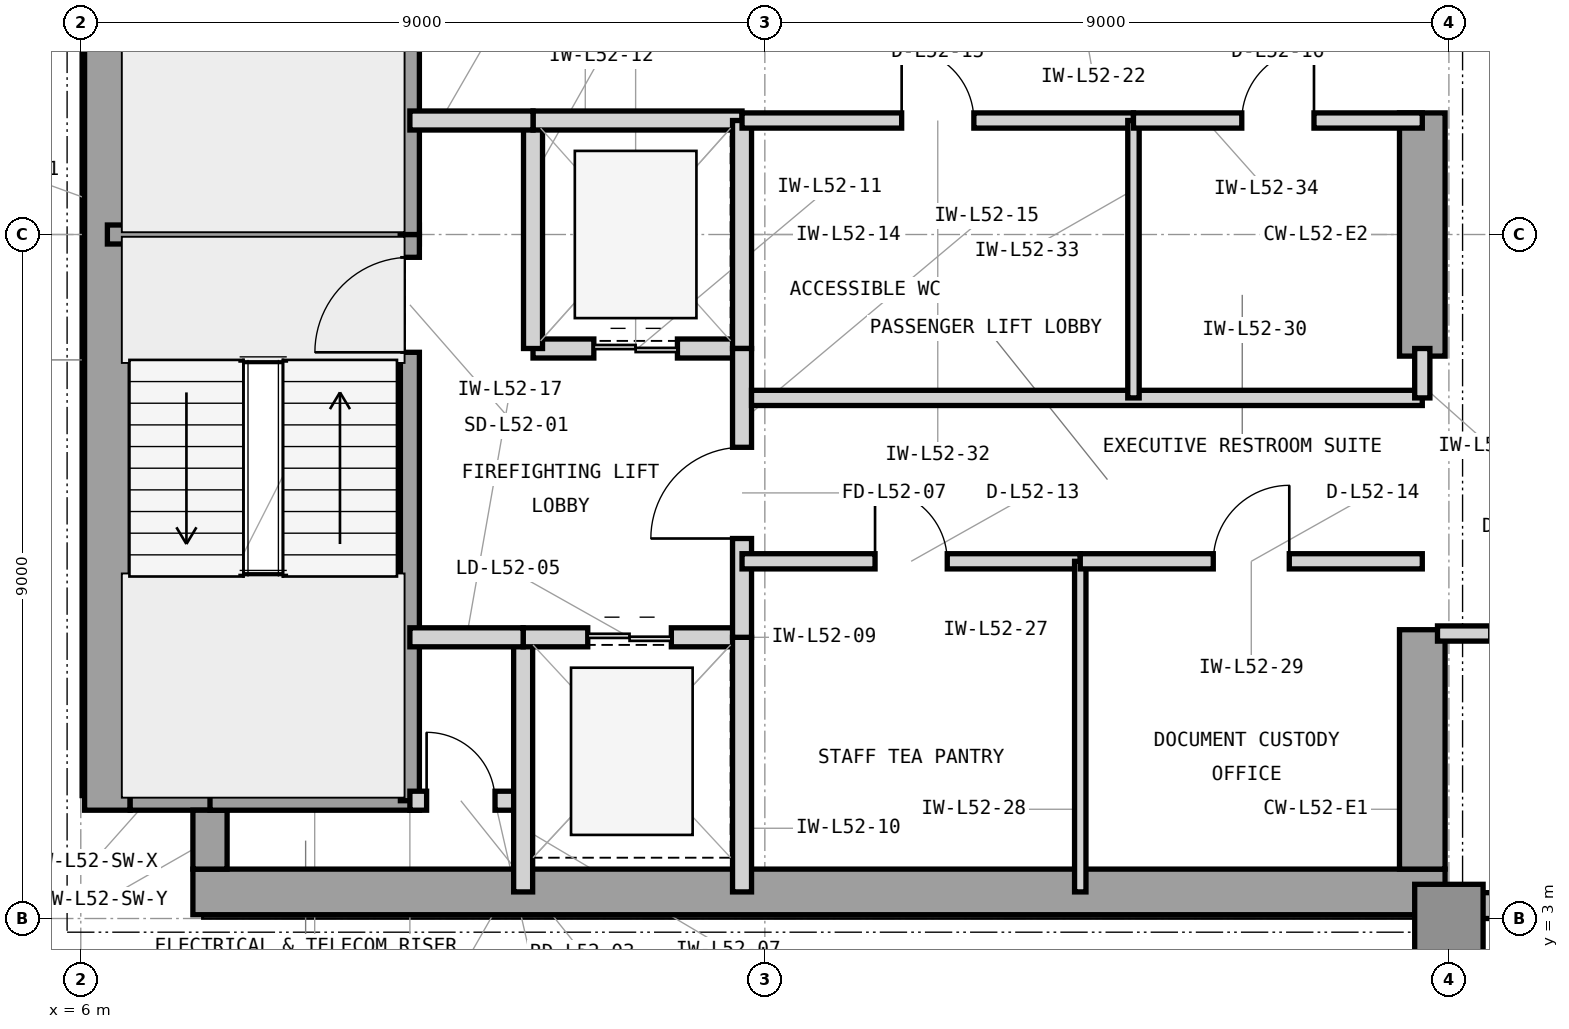
"""IFC4 building model, lengths in metres.
Left out: names, types, materials, properties, quantities, classifications, styles, units other than length and angle.
Written with IfcOpenShell. Run it as: python <this file> out.ifc"""

import sys

from ifc_helpers import new_model, si_unit, direction, frame, frame_2d, origin, origin_2d, place, context, subcontext, project, spatial, rectangle, extrude, element, fill, save


model = new_model("IFC4")
c1 = context("Model", 3, precision=1e-05, world=origin(), true_north=direction((0.0, 1.0)))
c2 = subcontext(c1, "Body", "Model", "MODEL_VIEW")
j1 = project(units=[si_unit("LENGTHUNIT", "METRE"), si_unit("PLANEANGLEUNIT", "RADIAN")], contexts=[c1])
p1 = place(None, origin())
s1 = spatial("IfcSite", under=j1, at=p1, CompositionType="ELEMENT")
p2 = place(p1, origin())
s2 = spatial("IfcBuilding", under=s1, at=p2, CompositionType="ELEMENT")
p3 = place(p2, frame((0.0, 0.0, 215.1)))
s3 = spatial("IfcBuildingStorey", under=s2, at=p3, CompositionType="ELEMENT", Elevation=215.1)
p4 = place(p3, frame((7.475, 3.35, 0.0), z_axis=(0.0, 0.0, 1.0), x_axis=(1.0, 0.0, 0.0)))
e1 = element("IfcWall", 1, at=p4, inside=s3, PredefinedType="SHEAR", context=c2, shape_type="SweptSolid", body=[
    extrude(rectangle(XDim=16.475, YDim=0.6, at=frame_2d((8.237, 0.0))), origin(), (0.0, 0.0, 1.0), 3.9),
])
p5 = place(p3, frame((6.35, 4.425, 0.0), z_axis=(0.0, 0.0, 1.0), x_axis=(0.0, 1.0, 0.0)))
e2 = element("IfcWall", 2, at=p5, inside=s3, PredefinedType="SHEAR", context=c2, shape_type="SweptSolid", body=[
    extrude(rectangle(XDim=15.15, YDim=0.6, at=frame_2d((7.575, 0.0))), origin(), (0.0, 0.0, 1.0), 3.9),
])
p6 = place(p3, frame((23.65, 3.65, 0.0), z_axis=(0.0, 0.0, 1.0), x_axis=(0.0, 1.0, 0.0)))
e3 = element("IfcWall", 3, at=p6, inside=s3, PredefinedType="SHEAR", context=c2, shape_type="SweptSolid", body=[
    extrude(rectangle(XDim=3.15, YDim=0.6, at=frame_2d((1.575, 0.0))), origin(), (0.0, 0.0, 1.0), 3.9),
])
p7 = place(p3, frame((23.65, 10.4, 0.0), z_axis=(0.0, 0.0, 1.0), x_axis=(0.0, 1.0, 0.0)))
e4 = element("IfcWall", 4, at=p7, inside=s3, PredefinedType="SHEAR", context=c2, shape_type="SweptSolid", body=[
    extrude(rectangle(XDim=3.2, YDim=0.6, at=frame_2d((1.6, 0.0))), origin(), (0.0, 0.0, 1.0), 3.9),
])
p8 = place(p3, frame((6.65, 4.65, 0.0), z_axis=(0.0, 0.0, 1.0), x_axis=(1.0, 0.0, 0.0)))
e5 = element("IfcWall", 5, at=p8, inside=s3, PredefinedType="SHEAR", context=c2, shape_type="SweptSolid", body=[
    extrude(rectangle(XDim=1.275, YDim=0.45, at=frame_2d((0.638, 0.0))), origin(), (0.0, 0.0, 1.0), 3.9),
])
p9 = place(p3, frame((7.7, 3.65, 0.0), z_axis=(0.0, 0.0, 1.0), x_axis=(0.0, 1.0, 0.0)))
e6 = element("IfcWall", 6, at=p9, inside=s3, PredefinedType="SHEAR", context=c2, shape_type="SweptSolid", body=[
    extrude(rectangle(XDim=0.775, YDim=0.45, at=frame_2d((0.388, 0.0))), origin(), (0.0, 0.0, 1.0), 3.9),
])
p10 = place(p3, frame((24.0, 3.0, 0.0), z_axis=(0.0, 0.0, 1.0), x_axis=(1.0, 0.0, 0.0)))
e7 = element("IfcColumn", 7, at=p10, inside=s3, PredefinedType="COLUMN", context=c2, shape_type="SweptSolid", body=[
    extrude(rectangle(XDim=0.9, YDim=0.9, at=origin_2d()), origin(), (0.0, 0.0, 1.0), 3.9),
])
p11 = place(p3, frame((23.9, 3.17, 0.0), z_axis=(0.0, 0.0, 1.0), x_axis=(1.0, 0.0, 0.0)))
e8 = element("IfcWall", 8, at=p11, inside=s3, PredefinedType="STANDARD", context=c2, shape_type="SweptSolid", body=[
    extrude(rectangle(XDim=31.5, YDim=0.34, at=frame_2d((15.75, 0.0))), origin(), (0.0, 0.0, 1.0), 3.7),
])
p12 = place(p11, frame((5.6, 0.0, 0.9)))
e9 = element("IfcOpeningElement", 9, at=p12, cuts=e8, PredefinedType="OPENING", context=c2, shape_type="SweptSolid", body=[
    extrude(rectangle(XDim=2.3, YDim=2.2, at=frame_2d((1.15, 1.1))), frame((0.0, 0.18, 0.0), z_axis=(0.0, -1.0, 0.0), x_axis=(1.0, 0.0, 0.0)), (0.0, 0.0, 1.0), 0.36),
])
p13 = place(p11, frame((14.6, 0.0, 0.9)))
e10 = element("IfcOpeningElement", 10, at=p13, cuts=e8, PredefinedType="OPENING", context=c2, shape_type="SweptSolid", body=[
    extrude(rectangle(XDim=2.3, YDim=2.2, at=frame_2d((1.15, 1.1))), frame((0.0, 0.18, 0.0), z_axis=(0.0, -1.0, 0.0), x_axis=(1.0, 0.0, 0.0)), (0.0, 0.0, 1.0), 0.36),
])
p14 = place(p11, frame((19.1, 0.0, 0.9)))
e11 = element("IfcOpeningElement", 11, at=p14, cuts=e8, PredefinedType="OPENING", context=c2, shape_type="SweptSolid", body=[
    extrude(rectangle(XDim=2.3, YDim=2.2, at=frame_2d((1.15, 1.1))), frame((0.0, 0.18, 0.0), z_axis=(0.0, -1.0, 0.0), x_axis=(1.0, 0.0, 0.0)), (0.0, 0.0, 1.0), 0.36),
])
p15 = place(p11, frame((0.9, 0.0, 0.9)))
e12 = element("IfcOpeningElement", 12, at=p15, cuts=e8, PredefinedType="OPENING", context=c2, shape_type="SweptSolid", body=[
    extrude(rectangle(XDim=1.6, YDim=2.2, at=frame_2d((0.8, 1.1))), frame((0.0, 0.18, 0.0), z_axis=(0.0, -1.0, 0.0), x_axis=(1.0, 0.0, 0.0)), (0.0, 0.0, 1.0), 0.36),
])
p16 = place(p3, frame((6.35, 12.0, 0.0), z_axis=(0.0, 0.0, 1.0), x_axis=(1.0, 0.0, 0.0)))
e13 = element("IfcWall", 13, at=p16, inside=s3, PredefinedType="SHEAR", context=c2, shape_type="SweptSolid", body=[
    extrude(rectangle(XDim=4.105, YDim=0.25, at=frame_2d((2.052, 0.0))), origin(), (0.0, 0.0, 1.0), 3.9),
])
p17 = place(p3, frame((7.7, 4.55, 0.0), z_axis=(0.0, 0.0, 1.0), x_axis=(1.0, 0.0, 0.0)))
e14 = element("IfcWall", 14, at=p17, inside=s3, PredefinedType="SHEAR", context=c2, shape_type="SweptSolid", body=[
    extrude(rectangle(XDim=2.755, YDim=0.25, at=frame_2d((1.377, 0.0))), origin(), (0.0, 0.0, 1.0), 3.9),
])
p18 = place(p3, frame((10.33, 4.55, 0.0), z_axis=(0.0, 0.0, 1.0), x_axis=(0.0, 1.0, 0.0)))
e15 = element("IfcWall", 15, at=p18, inside=s3, PredefinedType="SHEAR", context=c2, shape_type="SweptSolid", body=[
    extrude(rectangle(XDim=7.45, YDim=0.25, at=frame_2d((3.725, 0.0))), origin(), (0.0, 0.0, 1.0), 3.9),
])
p19 = place(p18, frame((5.9, 0.0, 0.0)))
e16 = element("IfcOpeningElement", 16, at=p19, cuts=e15, PredefinedType="OPENING", context=c2, shape_type="SweptSolid", body=[
    extrude(rectangle(XDim=1.25, YDim=2.2, at=frame_2d((0.625, 1.1))), frame((0.0, 0.135, 0.0), z_axis=(0.0, -1.0, 0.0), x_axis=(1.0, 0.0, 0.0)), (0.0, 0.0, 1.0), 0.27),
])
p20 = place(p3, frame((10.33, 12.0, 0.0), z_axis=(0.0, 0.0, 1.0), x_axis=(0.0, 1.0, 0.0)))
e17 = element("IfcWall", 17, at=p20, inside=s3, PredefinedType="SHEAR", context=c2, shape_type="SweptSolid", body=[
    extrude(rectangle(XDim=7.45, YDim=0.25, at=frame_2d((3.725, 0.0))), origin(), (0.0, 0.0, 1.0), 3.9),
])
p21 = place(p20, frame((5.85, 0.0, 0.0)))
e18 = element("IfcOpeningElement", 18, at=p21, cuts=e17, PredefinedType="OPENING", context=c2, shape_type="SweptSolid", body=[
    extrude(rectangle(XDim=1.25, YDim=2.2, at=frame_2d((0.625, 1.1))), frame((0.0, 0.135, 0.0), z_axis=(0.0, -1.0, 0.0), x_axis=(1.0, 0.0, 0.0)), (0.0, 0.0, 1.0), 0.27),
])
p22 = place(p3, frame((10.33, 4.55, 0.0), z_axis=(0.0, 0.0, 1.0), x_axis=(1.0, 0.0, 0.0)))
e19 = element("IfcWall", 19, at=p22, inside=s3, PredefinedType="PARTITIONING", context=c2, shape_type="SweptSolid", body=[
    extrude(rectangle(XDim=1.49, YDim=0.25, at=frame_2d((0.745, 0.0))), origin(), (0.0, 0.0, 1.0), 3.69),
])
p23 = place(p22, frame((0.22, 0.0, 0.0)))
e20 = element("IfcOpeningElement", 20, at=p23, cuts=e19, PredefinedType="OPENING", context=c2, shape_type="SweptSolid", body=[
    extrude(rectangle(XDim=0.9, YDim=2.1, at=frame_2d((0.45, 1.05))), frame((0.0, 0.135, 0.0), z_axis=(0.0, -1.0, 0.0), x_axis=(1.0, 0.0, 0.0)), (0.0, 0.0, 1.0), 0.27),
])
p24 = place(p3, frame((11.82, 3.35, 0.0), z_axis=(0.0, 0.0, 1.0), x_axis=(0.0, 1.0, 0.0)))
e21 = element("IfcWall", 21, at=p24, inside=s3, PredefinedType="PARTITIONING", context=c2, shape_type="SweptSolid", body=[
    extrude(rectangle(XDim=3.35, YDim=0.25, at=frame_2d((1.675, 0.0))), origin(), (0.0, 0.0, 1.0), 3.69),
])
p25 = place(p3, frame((11.82, 6.7, 0.0), z_axis=(0.0, 0.0, 1.0), x_axis=(1.0, 0.0, 0.0)))
e22 = element("IfcWall", 22, at=p25, inside=s3, PredefinedType="PARTITIONING", context=c2, shape_type="SweptSolid", body=[
    extrude(rectangle(XDim=2.88, YDim=0.25, at=frame_2d((1.44, 0.0))), origin(), (0.0, 0.0, 1.0), 3.283),
])
p26 = place(p25, frame((0.85, 0.0, 0.0)))
e23 = element("IfcOpeningElement", 23, at=p26, cuts=e22, PredefinedType="OPENING", context=c2, shape_type="SweptSolid", body=[
    extrude(rectangle(XDim=1.1, YDim=2.25, at=frame_2d((0.55, 1.125))), frame((0.0, 0.135, 0.0), z_axis=(0.0, -1.0, 0.0), x_axis=(1.0, 0.0, 0.0)), (0.0, 0.0, 1.0), 0.27),
])
p27 = place(p3, frame((14.7, 3.35, 0.0), z_axis=(0.0, 0.0, 1.0), x_axis=(0.0, 1.0, 0.0)))
e24 = element("IfcWall", 24, at=p27, inside=s3, PredefinedType="PARTITIONING", context=c2, shape_type="SweptSolid", body=[
    extrude(rectangle(XDim=3.35, YDim=0.25, at=frame_2d((1.675, 0.0))), origin(), (0.0, 0.0, 1.0), 3.69),
])
p28 = place(p3, frame((11.95, 10.5, 0.0), z_axis=(0.0, 0.0, 1.0), x_axis=(1.0, 0.0, 0.0)))
e25 = element("IfcWall", 25, at=p28, inside=s3, PredefinedType="PARTITIONING", context=c2, shape_type="SweptSolid", body=[
    extrude(rectangle(XDim=2.75, YDim=0.25, at=frame_2d((1.375, 0.0))), origin(), (0.0, 0.0, 1.0), 3.283),
])
p29 = place(p28, frame((0.8, 0.0, 0.0)))
e26 = element("IfcOpeningElement", 26, at=p29, cuts=e25, PredefinedType="OPENING", context=c2, shape_type="SweptSolid", body=[
    extrude(rectangle(XDim=1.1, YDim=2.25, at=frame_2d((0.55, 1.125))), frame((0.0, 0.135, 0.0), z_axis=(0.0, -1.0, 0.0), x_axis=(1.0, 0.0, 0.0)), (0.0, 0.0, 1.0), 0.27),
])
p30 = place(p3, frame((11.95, 10.5, 0.0), z_axis=(0.0, 0.0, 1.0), x_axis=(0.0, 1.0, 0.0)))
e27 = element("IfcWall", 27, at=p30, inside=s3, PredefinedType="PARTITIONING", context=c2, shape_type="SweptSolid", body=[
    extrude(rectangle(XDim=3.0, YDim=0.25, at=frame_2d((1.5, 0.0))), origin(), (0.0, 0.0, 1.0), 3.69),
])
p31 = place(p3, frame((11.95, 13.5, 0.0), z_axis=(0.0, 0.0, 1.0), x_axis=(1.0, 0.0, 0.0)))
e28 = element("IfcWall", 28, at=p31, inside=s3, PredefinedType="PARTITIONING", context=c2, shape_type="SweptSolid", body=[
    extrude(rectangle(XDim=2.75, YDim=0.25, at=frame_2d((1.375, 0.0))), origin(), (0.0, 0.0, 1.0), 3.283),
])
p32 = place(p3, frame((14.7, 10.5, 0.0), z_axis=(0.0, 0.0, 1.0), x_axis=(0.0, 1.0, 0.0)))
e29 = element("IfcWall", 29, at=p32, inside=s3, PredefinedType="PARTITIONING", context=c2, shape_type="SweptSolid", body=[
    extrude(rectangle(XDim=3.0, YDim=0.25, at=frame_2d((1.5, 0.0))), origin(), (0.0, 0.0, 1.0), 3.69),
])
p33 = place(p3, frame((14.7, 6.7, 0.0), z_axis=(0.0, 0.0, 1.0), x_axis=(0.0, 1.0, 0.0)))
e30 = element("IfcWall", 30, at=p33, inside=s3, PredefinedType="PARTITIONING", context=c2, shape_type="SweptSolid", body=[
    extrude(rectangle(XDim=3.8, YDim=0.25, at=frame_2d((1.9, 0.0))), origin(), (0.0, 0.0, 1.0), 3.69),
])
p34 = place(p33, frame((1.3, 0.0, 0.0)))
e31 = element("IfcOpeningElement", 31, at=p34, cuts=e30, PredefinedType="OPENING", context=c2, shape_type="SweptSolid", body=[
    extrude(rectangle(XDim=1.2, YDim=2.2, at=frame_2d((0.6, 1.1))), frame((0.0, 0.135, 0.0), z_axis=(0.0, -1.0, 0.0), x_axis=(1.0, 0.0, 0.0)), (0.0, 0.0, 1.0), 0.27),
])
p35 = place(p3, frame((10.33, 13.5, 0.0), z_axis=(0.0, 0.0, 1.0), x_axis=(1.0, 0.0, 0.0)))
e32 = element("IfcWall", 32, at=p35, inside=s3, PredefinedType="PARTITIONING", context=c2, shape_type="SweptSolid", body=[
    extrude(rectangle(XDim=1.62, YDim=0.25, at=frame_2d((0.81, 0.0))), origin(), (0.0, 0.0, 1.0), 3.283),
])
p36 = place(p3, frame((10.33, 6.7, 0.0), z_axis=(0.0, 0.0, 1.0), x_axis=(1.0, 0.0, 0.0)))
e33 = element("IfcWall", 33, at=p36, inside=s3, PredefinedType="PARTITIONING", context=c2, shape_type="SweptSolid", body=[
    extrude(rectangle(XDim=1.49, YDim=0.25, at=frame_2d((0.745, 0.0))), origin(), (0.0, 0.0, 1.0), 3.283),
])
p37 = place(p3, frame((14.7, 7.7, 0.0), z_axis=(0.0, 0.0, 1.0), x_axis=(1.0, 0.0, 0.0)))
e34 = element("IfcWall", 34, at=p37, inside=s3, PredefinedType="PARTITIONING", context=c2, shape_type="SweptSolid", body=[
    extrude(rectangle(XDim=4.45, YDim=0.2, at=frame_2d((2.225, 0.0))), origin(), (0.0, 0.0, 1.0), 3.69),
])
p38 = place(p37, frame((1.75, 0.0, 0.0)))
e35 = element("IfcOpeningElement", 35, at=p38, cuts=e34, PredefinedType="OPENING", context=c2, shape_type="SweptSolid", body=[
    extrude(rectangle(XDim=0.95, YDim=2.1, at=frame_2d((0.475, 1.05))), frame((0.0, 0.11, 0.0), z_axis=(0.0, -1.0, 0.0), x_axis=(1.0, 0.0, 0.0)), (0.0, 0.0, 1.0), 0.22),
])
p39 = place(p3, frame((19.15, 3.35, 0.0), z_axis=(0.0, 0.0, 1.0), x_axis=(0.0, 1.0, 0.0)))
e36 = element("IfcWall", 36, at=p39, inside=s3, PredefinedType="PARTITIONING", context=c2, shape_type="SweptSolid", body=[
    extrude(rectangle(XDim=4.35, YDim=0.15, at=frame_2d((2.175, 0.0))), origin(), (0.0, 0.0, 1.0), 3.69),
])
p40 = place(p3, frame((19.15, 7.7, 0.0), z_axis=(0.0, 0.0, 1.0), x_axis=(1.0, 0.0, 0.0)))
e37 = element("IfcWall", 37, at=p40, inside=s3, PredefinedType="PARTITIONING", context=c2, shape_type="SweptSolid", body=[
    extrude(rectangle(XDim=4.5, YDim=0.2, at=frame_2d((2.25, 0.0))), origin(), (0.0, 0.0, 1.0), 3.69),
])
p41 = place(p40, frame((1.75, 0.0, 0.0)))
e38 = element("IfcOpeningElement", 38, at=p41, cuts=e37, PredefinedType="OPENING", context=c2, shape_type="SweptSolid", body=[
    extrude(rectangle(XDim=1.0, YDim=2.15, at=frame_2d((0.5, 1.075))), frame((0.0, 0.11, 0.0), z_axis=(0.0, -1.0, 0.0), x_axis=(1.0, 0.0, 0.0)), (0.0, 0.0, 1.0), 0.22),
])
p42 = place(p3, frame((14.825, 9.85, 0.0), z_axis=(0.0, 0.0, 1.0), x_axis=(1.0, 0.0, 0.0)))
e39 = element("IfcWall", 39, at=p42, inside=s3, PredefinedType="PARTITIONING", context=c2, shape_type="SweptSolid", body=[
    extrude(rectangle(XDim=8.825, YDim=0.2, at=frame_2d((4.413, 0.0))), origin(), (0.0, 0.0, 1.0), 3.69),
])
p43 = place(p3, frame((23.65, 9.85, 0.0), z_axis=(0.0, 0.0, 1.0), x_axis=(0.0, 1.0, 0.0)))
e40 = element("IfcWall", 40, at=p43, inside=s3, PredefinedType="PARTITIONING", context=c2, shape_type="SweptSolid", body=[
    extrude(rectangle(XDim=0.65, YDim=0.2, at=frame_2d((0.325, 0.0))), origin(), (0.0, 0.0, 1.0), 3.69),
])
p44 = place(p3, frame((14.7, 13.5, 0.0), z_axis=(0.0, 0.0, 1.0), x_axis=(1.0, 0.0, 0.0)))
e41 = element("IfcWall", 41, at=p44, inside=s3, PredefinedType="PARTITIONING", context=c2, shape_type="SweptSolid", body=[
    extrude(rectangle(XDim=5.15, YDim=0.2, at=frame_2d((2.575, 0.0))), origin(), (0.0, 0.0, 1.0), 3.283),
])
p45 = place(p44, frame((2.1, 0.0, 0.0)))
e42 = element("IfcOpeningElement", 42, at=p45, cuts=e41, PredefinedType="OPENING", context=c2, shape_type="SweptSolid", body=[
    extrude(rectangle(XDim=0.95, YDim=2.1, at=frame_2d((0.475, 1.05))), frame((0.0, 0.11, 0.0), z_axis=(0.0, -1.0, 0.0), x_axis=(1.0, 0.0, 0.0)), (0.0, 0.0, 1.0), 0.22),
])
p46 = place(p3, frame((19.85, 9.85, 0.0), z_axis=(0.0, 0.0, 1.0), x_axis=(0.0, 1.0, 0.0)))
e43 = element("IfcWall", 43, at=p46, inside=s3, PredefinedType="PARTITIONING", context=c2, shape_type="SweptSolid", body=[
    extrude(rectangle(XDim=3.65, YDim=0.15, at=frame_2d((1.825, 0.0))), origin(), (0.0, 0.0, 1.0), 3.69),
])
p47 = place(p3, frame((19.85, 13.5, 0.0), z_axis=(0.0, 0.0, 1.0), x_axis=(1.0, 0.0, 0.0)))
e44 = element("IfcWall", 44, at=p47, inside=s3, PredefinedType="PARTITIONING", context=c2, shape_type="SweptSolid", body=[
    extrude(rectangle(XDim=3.8, YDim=0.2, at=frame_2d((1.9, 0.0))), origin(), (0.0, 0.0, 1.0), 3.283),
])
p48 = place(p47, frame((1.425, 0.0, 0.0)))
e45 = element("IfcOpeningElement", 45, at=p48, cuts=e44, PredefinedType="OPENING", context=c2, shape_type="SweptSolid", body=[
    extrude(rectangle(XDim=0.95, YDim=2.1, at=frame_2d((0.475, 1.05))), frame((0.0, 0.11, 0.0), z_axis=(0.0, -1.0, 0.0), x_axis=(1.0, 0.0, 0.0)), (0.0, 0.0, 1.0), 0.22),
])
p49 = place(p3, frame((23.85, 6.75, 0.0), z_axis=(0.0, 0.0, 1.0), x_axis=(1.0, 0.0, 0.0)))
e46 = element("IfcWall", 46, at=p49, inside=s3, PredefinedType="PARTITIONING", context=c2, shape_type="SweptSolid", body=[
    extrude(rectangle(XDim=2.85, YDim=0.2, at=frame_2d((1.425, 0.0))), origin(), (0.0, 0.0, 1.0), 3.69),
])
p50 = place(p49, frame((0.7, 0.0, 0.0)))
e47 = element("IfcOpeningElement", 47, at=p50, cuts=e46, PredefinedType="OPENING", context=c2, shape_type="SweptSolid", body=[
    extrude(rectangle(XDim=1.0, YDim=2.15, at=frame_2d((0.5, 1.075))), frame((0.0, 0.11, 0.0), z_axis=(0.0, -1.0, 0.0), x_axis=(1.0, 0.0, 0.0)), (0.0, 0.0, 1.0), 0.22),
])
p51 = place(p19, origin())
e48 = element("IfcDoor", 48, at=p51, inside=s3, OperationType="SINGLE_SWING_LEFT", PredefinedType="DOOR", context=c2, shape_type="SweptSolid", body=[
    extrude(rectangle(XDim=1.25, YDim=2.2, at=frame_2d((0.625, 1.1))), frame((0.0, 0.025, 0.0), z_axis=(0.0, -1.0, 0.0), x_axis=(1.0, 0.0, 0.0)), (0.0, 0.0, 1.0), 0.05),
])
fill(e16, e48)
p52 = place(p23, origin())
e49 = element("IfcDoor", 49, at=p52, inside=s3, OperationType="SINGLE_SWING_LEFT", PredefinedType="TRAPDOOR", context=c2, shape_type="SweptSolid", body=[
    extrude(rectangle(XDim=0.9, YDim=2.1, at=frame_2d((0.45, 1.05))), frame((0.0, 0.025, 0.0), z_axis=(0.0, -1.0, 0.0), x_axis=(1.0, 0.0, 0.0)), (0.0, 0.0, 1.0), 0.05),
])
fill(e20, e49)
p53 = place(p26, origin())
e50 = element("IfcDoor", 50, at=p53, inside=s3, OperationType="DOUBLE_DOOR_SLIDING", PredefinedType="DOOR", context=c2, shape_type="SweptSolid", body=[
    extrude(rectangle(XDim=1.1, YDim=2.25, at=frame_2d((0.55, 1.125))), frame((0.0, 0.025, 0.0), z_axis=(0.0, -1.0, 0.0), x_axis=(1.0, 0.0, 0.0)), (0.0, 0.0, 1.0), 0.05),
])
fill(e23, e50)
p54 = place(p29, origin())
e51 = element("IfcDoor", 51, at=p54, inside=s3, OperationType="DOUBLE_DOOR_SLIDING", PredefinedType="DOOR", context=c2, shape_type="SweptSolid", body=[
    extrude(rectangle(XDim=1.1, YDim=2.25, at=frame_2d((0.55, 1.125))), frame((0.0, 0.025, 0.0), z_axis=(0.0, -1.0, 0.0), x_axis=(1.0, 0.0, 0.0)), (0.0, 0.0, 1.0), 0.05),
])
fill(e26, e51)
p55 = place(p34, origin())
e52 = element("IfcDoor", 52, at=p55, inside=s3, OperationType="SINGLE_SWING_LEFT", PredefinedType="DOOR", context=c2, shape_type="SweptSolid", body=[
    extrude(rectangle(XDim=1.2, YDim=2.2, at=frame_2d((0.6, 1.1))), frame((0.0, 0.025, 0.0), z_axis=(0.0, -1.0, 0.0), x_axis=(1.0, 0.0, 0.0)), (0.0, 0.0, 1.0), 0.05),
])
fill(e31, e52)
p56 = place(p38, origin())
e53 = element("IfcDoor", 53, at=p56, inside=s3, OperationType="SINGLE_SWING_LEFT", PredefinedType="DOOR", context=c2, shape_type="SweptSolid", body=[
    extrude(rectangle(XDim=0.95, YDim=2.1, at=frame_2d((0.475, 1.05))), frame((0.0, 0.025, 0.0), z_axis=(0.0, -1.0, 0.0), x_axis=(1.0, 0.0, 0.0)), (0.0, 0.0, 1.0), 0.05),
])
fill(e35, e53)
p57 = place(p41, origin())
e54 = element("IfcDoor", 54, at=p57, inside=s3, OperationType="SINGLE_SWING_RIGHT", PredefinedType="DOOR", context=c2, shape_type="SweptSolid", body=[
    extrude(rectangle(XDim=1.0, YDim=2.15, at=frame_2d((0.5, 1.075))), frame((0.0, 0.025, 0.0), z_axis=(0.0, -1.0, 0.0), x_axis=(1.0, 0.0, 0.0)), (0.0, 0.0, 1.0), 0.05),
])
fill(e38, e54)
p58 = place(p45, origin())
e55 = element("IfcDoor", 55, at=p58, inside=s3, OperationType="SINGLE_SWING_LEFT", PredefinedType="DOOR", context=c2, shape_type="SweptSolid", body=[
    extrude(rectangle(XDim=0.95, YDim=2.1, at=frame_2d((0.475, 1.05))), frame((0.0, 0.025, 0.0), z_axis=(0.0, -1.0, 0.0), x_axis=(1.0, 0.0, 0.0)), (0.0, 0.0, 1.0), 0.05),
])
fill(e42, e55)
p59 = place(p48, origin())
e56 = element("IfcDoor", 56, at=p59, inside=s3, OperationType="SINGLE_SWING_RIGHT", PredefinedType="DOOR", context=c2, shape_type="SweptSolid", body=[
    extrude(rectangle(XDim=0.95, YDim=2.1, at=frame_2d((0.475, 1.05))), frame((0.0, 0.025, 0.0), z_axis=(0.0, -1.0, 0.0), x_axis=(1.0, 0.0, 0.0)), (0.0, 0.0, 1.0), 0.05),
])
fill(e45, e56)
save(model, sys.argv[1])
